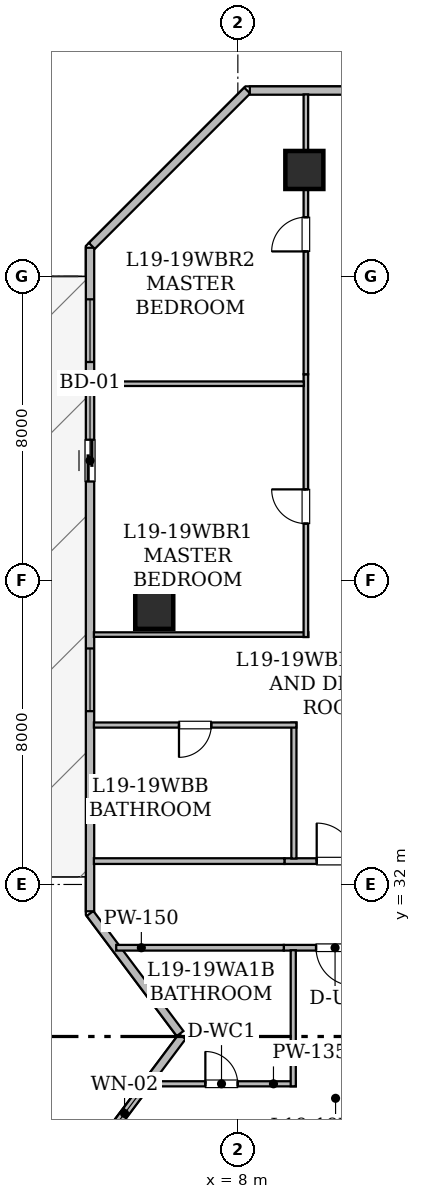
"""IFC4 building model, lengths in metres.
Left out: names, types, materials, properties, quantities, classifications, styles, units other than length and angle.
Written with IfcOpenShell. Run it as: python <this file> out.ifc"""

import sys

from ifc_helpers import new_model, si_unit, direction, frame, frame_2d, origin, origin_2d, place, context, subcontext, project, spatial, rectangle, hollow_rectangle, extrude, element, fill, save


model = new_model("IFC4")
c1 = context("Model", 3, precision=1e-05, world=origin(), true_north=direction((0.0, 1.0)))
c2 = subcontext(c1, "Body", "Model", "MODEL_VIEW")
j1 = project(units=[si_unit("LENGTHUNIT", "METRE"), si_unit("PLANEANGLEUNIT", "RADIAN")], contexts=[c1])
p1 = place(None, origin())
s1 = spatial("IfcSite", under=j1, at=p1, CompositionType="ELEMENT")
p2 = place(p1, origin())
s2 = spatial("IfcBuilding", under=s1, at=p2, CompositionType="ELEMENT")
p3 = place(p2, frame((0.0, 0.0, 77.1)))
s3 = spatial("IfcBuildingStorey", under=s2, at=p3, CompositionType="ELEMENT", Elevation=77.1)
for number, where, z_axis, x_axis in (
    (1, (9.75, 50.8, 0.0), (0.0, 0.0, 1.0), (1.0, 0.0, 0.0)),
    (2, (5.8, 39.225, 0.0), (0.0, 0.0, 1.0), (1.0, 0.0, 0.0)),
):
    element("IfcColumn", number, at=place(p3, frame(where, z_axis=z_axis, x_axis=x_axis)), inside=s3, PredefinedType="COLUMN", context=c2, shape_type="SweptSolid", body=[
        extrude(hollow_rectangle(XDim=1.0, YDim=1.0, WallThickness=0.05, at=origin_2d()), origin(), (0.0, 0.0, 1.0), 3.65),
    ])
p4 = place(p3, frame((4.145, 24.809, 0.0), z_axis=(0.0, 0.0, 1.0), x_axis=(0.599823674734, 0.800132213592, 0.0)))
e3 = element("IfcWall", 3, at=p4, inside=s3, PredefinedType="STANDARD", context=c2, shape_type="SweptSolid", body=[
    extrude(rectangle(XDim=3.988, YDim=0.22, at=frame_2d((1.994, 0.0))), origin(), (0.0, 0.0, 1.0), 3.43),
])
p5 = place(p4, frame((0.707, 0.0, 0.85)))
e4 = element("IfcOpeningElement", 4, at=p5, cuts=e3, PredefinedType="OPENING", context=c2, shape_type="SweptSolid", body=[
    extrude(rectangle(XDim=1.5, YDim=1.6, at=frame_2d((0.75, 0.8))), frame((0.0, 0.12, 0.0), z_axis=(0.0, -1.0, 0.0), x_axis=(1.0, 0.0, 0.0)), (0.0, 0.0, 1.0), 0.24),
])
p6 = place(p3, frame((6.48, 28.077, 0.0), z_axis=(0.0, 0.0, 1.0), x_axis=(-0.599960442794, 0.800029666377, 0.0)))
e5 = element("IfcWall", 5, at=p6, inside=s3, PredefinedType="STANDARD", context=c2, shape_type="SweptSolid", body=[
    extrude(rectangle(XDim=3.95, YDim=0.22, at=frame_2d((1.975, 0.0))), origin(), (0.0, 0.0, 1.0), 3.43),
])
p7 = place(p3, frame((4.11, 31.295, 0.0), z_axis=(0.0, 0.0, 1.0), x_axis=(0.0, 1.0, 0.0)))
e6 = element("IfcWall", 6, at=p7, inside=s3, PredefinedType="STANDARD", context=c2, shape_type="SweptSolid", body=[
    extrude(rectangle(XDim=17.459, YDim=0.22, at=frame_2d((8.729, 0.0))), origin(), (0.0, 0.0, 1.0), 3.43),
])
p8 = place(p7, frame((11.308, 0.0, 0.0)))
e7 = element("IfcOpeningElement", 7, at=p8, cuts=e6, PredefinedType="OPENING", context=c2, shape_type="SweptSolid", body=[
    extrude(rectangle(XDim=1.1, YDim=2.2, at=frame_2d((0.55, 1.1))), frame((0.0, 0.12, 0.0), z_axis=(0.0, -1.0, 0.0), x_axis=(1.0, 0.0, 0.0)), (0.0, 0.0, 1.0), 0.24),
])
p9 = place(p7, frame((5.265, 0.0, 0.85)))
e8 = element("IfcOpeningElement", 8, at=p9, cuts=e6, PredefinedType="OPENING", context=c2, shape_type="SweptSolid", body=[
    extrude(rectangle(XDim=1.65, YDim=1.55, at=frame_2d((0.825, 0.775))), frame((0.0, 0.12, 0.0), z_axis=(0.0, -1.0, 0.0), x_axis=(1.0, 0.0, 0.0)), (0.0, 0.0, 1.0), 0.24),
])
p10 = place(p7, frame((14.452, 0.0, 0.85)))
e9 = element("IfcOpeningElement", 9, at=p10, cuts=e6, PredefinedType="OPENING", context=c2, shape_type="SweptSolid", body=[
    extrude(rectangle(XDim=1.65, YDim=1.55, at=frame_2d((0.825, 0.775))), frame((0.0, 0.12, 0.0), z_axis=(0.0, -1.0, 0.0), x_axis=(1.0, 0.0, 0.0)), (0.0, 0.0, 1.0), 0.24),
])
p11 = place(p3, frame((4.158, 48.802, 0.0), z_axis=(0.0, 0.0, 1.0), x_axis=(0.70712789547, 0.707085666273, 0.0)))
e10 = element("IfcWall", 10, at=p11, inside=s3, PredefinedType="STANDARD", context=c2, shape_type="SweptSolid", body=[
    extrude(rectangle(XDim=5.781, YDim=0.22, at=frame_2d((2.891, 0.0))), origin(), (0.0, 0.0, 1.0), 3.43),
])
p12 = place(p3, frame((8.315, 52.89, 0.0), z_axis=(0.0, 0.0, 1.0), x_axis=(1.0, 0.0, 0.0)))
e11 = element("IfcWall", 11, at=p12, inside=s3, PredefinedType="STANDARD", context=c2, shape_type="SweptSolid", body=[
    extrude(rectangle(XDim=37.439, YDim=0.22, at=frame_2d((18.719, 0.0))), origin(), (0.0, 0.0, 1.0), 3.43),
])
p13 = place(p12, frame((5.093, 0.0, 0.85)))
e12 = element("IfcOpeningElement", 12, at=p13, cuts=e11, PredefinedType="OPENING", context=c2, shape_type="SweptSolid", body=[
    extrude(rectangle(XDim=1.65, YDim=1.55, at=frame_2d((0.825, 0.775))), frame((0.0, 0.12, 0.0), z_axis=(0.0, -1.0, 0.0), x_axis=(1.0, 0.0, 0.0)), (0.0, 0.0, 1.0), 0.24),
])
p14 = place(p12, frame((13.055, 0.0, 0.8)))
e13 = element("IfcOpeningElement", 13, at=p14, cuts=e11, PredefinedType="OPENING", context=c2, shape_type="SweptSolid", body=[
    extrude(rectangle(XDim=1.2, YDim=1.5, at=frame_2d((0.6, 0.75))), frame((0.0, 0.12, 0.0), z_axis=(0.0, -1.0, 0.0), x_axis=(1.0, 0.0, 0.0)), (0.0, 0.0, 1.0), 0.24),
])
p15 = place(p12, frame((10.005, 0.0, 0.85)))
e14 = element("IfcOpeningElement", 14, at=p15, cuts=e11, PredefinedType="OPENING", context=c2, shape_type="SweptSolid", body=[
    extrude(rectangle(XDim=1.65, YDim=1.55, at=frame_2d((0.825, 0.775))), frame((0.0, 0.12, 0.0), z_axis=(0.0, -1.0, 0.0), x_axis=(1.0, 0.0, 0.0)), (0.0, 0.0, 1.0), 0.24),
])
p16 = place(p12, frame((15.655, 0.0, 0.85)))
e15 = element("IfcOpeningElement", 15, at=p16, cuts=e11, PredefinedType="OPENING", context=c2, shape_type="SweptSolid", body=[
    extrude(rectangle(XDim=1.65, YDim=1.55, at=frame_2d((0.825, 0.775))), frame((0.0, 0.12, 0.0), z_axis=(0.0, -1.0, 0.0), x_axis=(1.0, 0.0, 0.0)), (0.0, 0.0, 1.0), 0.24),
])
p17 = place(p12, frame((25.185, 0.0, 0.8)))
e16 = element("IfcOpeningElement", 16, at=p17, cuts=e11, PredefinedType="OPENING", context=c2, shape_type="SweptSolid", body=[
    extrude(rectangle(XDim=1.2, YDim=1.5, at=frame_2d((0.6, 0.75))), frame((0.0, 0.12, 0.0), z_axis=(0.0, -1.0, 0.0), x_axis=(1.0, 0.0, 0.0)), (0.0, 0.0, 1.0), 0.24),
])
p18 = place(p12, frame((20.935, 0.0, 0.85)))
e17 = element("IfcOpeningElement", 17, at=p18, cuts=e11, PredefinedType="OPENING", context=c2, shape_type="SweptSolid", body=[
    extrude(rectangle(XDim=1.65, YDim=1.55, at=frame_2d((0.825, 0.775))), frame((0.0, 0.12, 0.0), z_axis=(0.0, -1.0, 0.0), x_axis=(1.0, 0.0, 0.0)), (0.0, 0.0, 1.0), 0.24),
])
p19 = place(p12, frame((28.985, 0.0, 0.85)))
e18 = element("IfcOpeningElement", 18, at=p19, cuts=e11, PredefinedType="OPENING", context=c2, shape_type="SweptSolid", body=[
    extrude(rectangle(XDim=1.65, YDim=1.55, at=frame_2d((0.825, 0.775))), frame((0.0, 0.12, 0.0), z_axis=(0.0, -1.0, 0.0), x_axis=(1.0, 0.0, 0.0)), (0.0, 0.0, 1.0), 0.24),
])
p20 = place(p12, frame((33.98, 0.0, 0.85)))
e19 = element("IfcOpeningElement", 19, at=p20, cuts=e11, PredefinedType="OPENING", context=c2, shape_type="SweptSolid", body=[
    extrude(rectangle(XDim=1.65, YDim=1.55, at=frame_2d((0.825, 0.775))), frame((0.0, 0.12, 0.0), z_axis=(0.0, -1.0, 0.0), x_axis=(1.0, 0.0, 0.0)), (0.0, 0.0, 1.0), 0.24),
])
p21 = place(p3, frame((11.907, 30.335, 0.0), z_axis=(0.0, 0.0, 1.0), x_axis=(-1.0, 0.0, 0.0)))
e20 = element("IfcWall", 20, at=p21, inside=s3, PredefinedType="STANDARD", context=c2, shape_type="SweptSolid", body=[
    extrude(rectangle(XDim=2.698, YDim=0.15, at=frame_2d((1.349, 0.0))), origin(), (0.0, 0.0, 1.0), 3.43),
])
p22 = place(p21, frame((0.849, 0.0, 0.0)))
e21 = element("IfcOpeningElement", 21, at=p22, cuts=e20, PredefinedType="OPENING", context=c2, shape_type="SweptSolid", body=[
    extrude(rectangle(XDim=1.0, YDim=2.15, at=frame_2d((0.5, 1.075))), frame((0.0, 0.085, 0.0), z_axis=(0.0, -1.0, 0.0), x_axis=(1.0, 0.0, 0.0)), (0.0, 0.0, 1.0), 0.17),
])
p23 = place(p3, frame((9.209, 30.335, 0.0), z_axis=(0.0, 0.0, 1.0), x_axis=(-1.0, 0.0, 0.0)))
e22 = element("IfcWall", 22, at=p23, inside=s3, PredefinedType="STANDARD", context=c2, shape_type="SweptSolid", body=[
    extrude(rectangle(XDim=4.41, YDim=0.15, at=frame_2d((2.205, 0.0))), origin(), (0.0, 0.0, 1.0), 2.803),
])
p24 = place(p3, frame((9.226, 32.615, 0.0), z_axis=(0.0, 0.0, 1.0), x_axis=(1.0, 0.0, 0.0)))
e23 = element("IfcWall", 23, at=p24, inside=s3, PredefinedType="STANDARD", context=c2, shape_type="SweptSolid", body=[
    extrude(rectangle(XDim=2.698, YDim=0.15, at=frame_2d((1.349, 0.0))), origin(), (0.0, 0.0, 1.0), 3.43),
])
p25 = place(p24, frame((0.849, 0.0, 0.0)))
e24 = element("IfcOpeningElement", 24, at=p25, cuts=e23, PredefinedType="OPENING", context=c2, shape_type="SweptSolid", body=[
    extrude(rectangle(XDim=1.0, YDim=2.15, at=frame_2d((0.5, 1.075))), frame((0.0, 0.085, 0.0), z_axis=(0.0, -1.0, 0.0), x_axis=(1.0, 0.0, 0.0)), (0.0, 0.0, 1.0), 0.17),
])
p26 = place(p3, frame((4.212, 32.615, 0.0), z_axis=(0.0, 0.0, 1.0), x_axis=(1.0, 0.0, 0.0)))
e25 = element("IfcWall", 25, at=p26, inside=s3, PredefinedType="STANDARD", context=c2, shape_type="SweptSolid", body=[
    extrude(rectangle(XDim=5.014, YDim=0.15, at=frame_2d((2.507, 0.0))), origin(), (0.0, 0.0, 1.0), 2.803),
])
p27 = place(p3, frame((5.618, 26.755, 0.0), z_axis=(0.0, 0.0, 1.0), x_axis=(1.0, 0.0, 0.0)))
e26 = element("IfcWall", 26, at=p27, inside=s3, PredefinedType="PARTITIONING", context=c2, shape_type="SweptSolid", body=[
    extrude(rectangle(XDim=3.905, YDim=0.135, at=frame_2d((1.953, 0.0))), origin(), (0.0, 0.0, 1.0), 2.803),
])
p28 = place(p27, frame((1.527, 0.0, 0.0)))
e27 = element("IfcOpeningElement", 27, at=p28, cuts=e26, PredefinedType="OPENING", context=c2, shape_type="SweptSolid", body=[
    extrude(rectangle(XDim=0.85, YDim=2.1, at=frame_2d((0.425, 1.05))), frame((0.0, 0.077, 0.0), z_axis=(0.0, -1.0, 0.0), x_axis=(1.0, 0.0, 0.0)), (0.0, 0.0, 1.0), 0.155),
])
p29 = place(p3, frame((9.458, 26.69, 0.0), z_axis=(0.0, 0.0, 1.0), x_axis=(0.0, 1.0, 0.0)))
e28 = element("IfcWall", 28, at=p29, inside=s3, PredefinedType="PARTITIONING", context=c2, shape_type="SweptSolid", body=[
    extrude(rectangle(XDim=3.58, YDim=0.135, at=frame_2d((1.79, 0.0))), origin(), (0.0, 0.0, 1.0), 3.43),
])
p30 = place(p3, frame((9.475, 32.682, 0.0), z_axis=(0.0, 0.0, 1.0), x_axis=(0.0, 1.0, 0.0)))
e29 = element("IfcWall", 29, at=p30, inside=s3, PredefinedType="PARTITIONING", context=c2, shape_type="SweptSolid", body=[
    extrude(rectangle(XDim=3.578, YDim=0.135, at=frame_2d((1.789, 0.0))), origin(), (0.0, 0.0, 1.0), 3.43),
])
p31 = place(p3, frame((9.54, 36.195, 0.0), z_axis=(0.0, 0.0, 1.0), x_axis=(-1.0, 0.0, 0.0)))
e30 = element("IfcWall", 30, at=p31, inside=s3, PredefinedType="PARTITIONING", context=c2, shape_type="SweptSolid", body=[
    extrude(rectangle(XDim=5.328, YDim=0.135, at=frame_2d((2.664, 0.0))), origin(), (0.0, 0.0, 1.0), 2.803),
])
p32 = place(p31, frame((2.239, 0.0, 0.0)))
e31 = element("IfcOpeningElement", 31, at=p32, cuts=e30, PredefinedType="OPENING", context=c2, shape_type="SweptSolid", body=[
    extrude(rectangle(XDim=0.85, YDim=2.1, at=frame_2d((0.425, 1.05))), frame((0.0, 0.077, 0.0), z_axis=(0.0, -1.0, 0.0), x_axis=(1.0, 0.0, 0.0)), (0.0, 0.0, 1.0), 0.155),
])
p33 = place(p3, frame((4.212, 38.575, 0.0), z_axis=(0.0, 0.0, 1.0), x_axis=(1.0, 0.0, 0.0)))
e32 = element("IfcWall", 32, at=p33, inside=s3, PredefinedType="PARTITIONING", context=c2, shape_type="SweptSolid", body=[
    extrude(rectangle(XDim=5.643, YDim=0.12, at=frame_2d((2.822, 0.0))), origin(), (0.0, 0.0, 1.0), 2.647),
])
p34 = place(p3, frame((9.79, 38.51, 0.0), z_axis=(0.0, 0.0, 1.0), x_axis=(0.0, 1.0, 0.0)))
e33 = element("IfcWall", 33, at=p34, inside=s3, PredefinedType="PARTITIONING", context=c2, shape_type="SweptSolid", body=[
    extrude(rectangle(XDim=6.915, YDim=0.12, at=frame_2d((3.458, 0.0))), origin(), (0.0, 0.0, 1.0), 2.647),
])
p35 = place(p34, frame((2.986, 0.0, 0.0)))
e34 = element("IfcOpeningElement", 34, at=p35, cuts=e33, PredefinedType="OPENING", context=c2, shape_type="SweptSolid", body=[
    extrude(rectangle(XDim=0.9, YDim=2.1, at=frame_2d((0.45, 1.05))), frame((0.0, 0.07, 0.0), z_axis=(0.0, -1.0, 0.0), x_axis=(1.0, 0.0, 0.0)), (0.0, 0.0, 1.0), 0.14),
])
p36 = place(p3, frame((9.79, 45.425, 0.0), z_axis=(0.0, 0.0, 1.0), x_axis=(0.0, 1.0, 0.0)))
e35 = element("IfcWall", 35, at=p36, inside=s3, PredefinedType="PARTITIONING", context=c2, shape_type="SweptSolid", body=[
    extrude(rectangle(XDim=7.363, YDim=0.12, at=frame_2d((3.682, 0.0))), origin(), (0.0, 0.0, 1.0), 2.647),
])
p37 = place(p36, frame((3.232, 0.0, 0.0)))
e36 = element("IfcOpeningElement", 36, at=p37, cuts=e35, PredefinedType="OPENING", context=c2, shape_type="SweptSolid", body=[
    extrude(rectangle(XDim=0.9, YDim=2.1, at=frame_2d((0.45, 1.05))), frame((0.0, 0.07, 0.0), z_axis=(0.0, -1.0, 0.0), x_axis=(1.0, 0.0, 0.0)), (0.0, 0.0, 1.0), 0.14),
])
p38 = place(p3, frame((4.212, 45.176, 0.0), z_axis=(0.0, 0.0, 1.0), x_axis=(1.0, 0.0, 0.0)))
e37 = element("IfcWall", 37, at=p38, inside=s3, PredefinedType="PARTITIONING", context=c2, shape_type="SweptSolid", body=[
    extrude(rectangle(XDim=5.524, YDim=0.12, at=frame_2d((2.762, 0.0))), origin(), (0.0, 0.0, 1.0), 2.803),
])
p39 = place(p8, origin())
e38 = element("IfcDoor", 38, at=p39, inside=s3, OperationType="SLIDING_TO_LEFT", PredefinedType="DOOR", context=c2, shape_type="SweptSolid", body=[
    extrude(rectangle(XDim=1.1, YDim=2.2, at=frame_2d((0.55, 1.1))), frame((0.0, 0.025, 0.0), z_axis=(0.0, -1.0, 0.0), x_axis=(1.0, 0.0, 0.0)), (0.0, 0.0, 1.0), 0.05),
])
fill(e7, e38)
p40 = place(p5, origin())
e39 = element("IfcWindow", 39, at=p40, inside=s3, PartitioningType="SINGLE_PANEL", PredefinedType="WINDOW", context=c2, shape_type="SweptSolid", body=[
    extrude(rectangle(XDim=1.5, YDim=1.6, at=frame_2d((0.75, 0.8))), frame((0.0, 0.03, 0.0), z_axis=(0.0, -1.0, 0.0), x_axis=(1.0, 0.0, 0.0)), (0.0, 0.0, 1.0), 0.06),
])
fill(e4, e39)
p41 = place(p9, origin())
e40 = element("IfcWindow", 40, at=p41, inside=s3, PartitioningType="SINGLE_PANEL", PredefinedType="WINDOW", context=c2, shape_type="SweptSolid", body=[
    extrude(rectangle(XDim=1.65, YDim=1.55, at=frame_2d((0.825, 0.775))), frame((0.0, 0.03, 0.0), z_axis=(0.0, -1.0, 0.0), x_axis=(1.0, 0.0, 0.0)), (0.0, 0.0, 1.0), 0.06),
])
fill(e8, e40)
p42 = place(p10, origin())
e41 = element("IfcWindow", 41, at=p42, inside=s3, PartitioningType="SINGLE_PANEL", PredefinedType="WINDOW", context=c2, shape_type="SweptSolid", body=[
    extrude(rectangle(XDim=1.65, YDim=1.55, at=frame_2d((0.825, 0.775))), frame((0.0, 0.03, 0.0), z_axis=(0.0, -1.0, 0.0), x_axis=(1.0, 0.0, 0.0)), (0.0, 0.0, 1.0), 0.06),
])
fill(e9, e41)
p43 = place(p22, origin())
e42 = element("IfcDoor", 42, at=p43, inside=s3, OperationType="SINGLE_SWING_LEFT", PredefinedType="DOOR", context=c2, shape_type="SweptSolid", body=[
    extrude(rectangle(XDim=1.0, YDim=2.15, at=frame_2d((0.5, 1.075))), frame((0.0, 0.025, 0.0), z_axis=(0.0, -1.0, 0.0), x_axis=(1.0, 0.0, 0.0)), (0.0, 0.0, 1.0), 0.05),
])
fill(e21, e42)
p44 = place(p25, origin())
e43 = element("IfcDoor", 43, at=p44, inside=s3, OperationType="SINGLE_SWING_LEFT", PredefinedType="DOOR", context=c2, shape_type="SweptSolid", body=[
    extrude(rectangle(XDim=1.0, YDim=2.15, at=frame_2d((0.5, 1.075))), frame((0.0, 0.025, 0.0), z_axis=(0.0, -1.0, 0.0), x_axis=(1.0, 0.0, 0.0)), (0.0, 0.0, 1.0), 0.05),
])
fill(e24, e43)
p45 = place(p28, origin())
e44 = element("IfcDoor", 44, at=p45, inside=s3, OperationType="SINGLE_SWING_LEFT", PredefinedType="DOOR", context=c2, shape_type="SweptSolid", body=[
    extrude(rectangle(XDim=0.85, YDim=2.1, at=frame_2d((0.425, 1.05))), frame((0.0, 0.025, 0.0), z_axis=(0.0, -1.0, 0.0), x_axis=(1.0, 0.0, 0.0)), (0.0, 0.0, 1.0), 0.05),
])
fill(e27, e44)
p46 = place(p32, origin())
e45 = element("IfcDoor", 45, at=p46, inside=s3, OperationType="SINGLE_SWING_RIGHT", PredefinedType="DOOR", context=c2, shape_type="SweptSolid", body=[
    extrude(rectangle(XDim=0.85, YDim=2.1, at=frame_2d((0.425, 1.05))), frame((0.0, 0.025, 0.0), z_axis=(0.0, -1.0, 0.0), x_axis=(1.0, 0.0, 0.0)), (0.0, 0.0, 1.0), 0.05),
])
fill(e31, e45)
p47 = place(p35, origin())
e46 = element("IfcDoor", 46, at=p47, inside=s3, OperationType="SINGLE_SWING_RIGHT", PredefinedType="DOOR", context=c2, shape_type="SweptSolid", body=[
    extrude(rectangle(XDim=0.9, YDim=2.1, at=frame_2d((0.45, 1.05))), frame((0.0, 0.025, 0.0), z_axis=(0.0, -1.0, 0.0), x_axis=(1.0, 0.0, 0.0)), (0.0, 0.0, 1.0), 0.05),
])
fill(e34, e46)
p48 = place(p37, origin())
e47 = element("IfcDoor", 47, at=p48, inside=s3, OperationType="SINGLE_SWING_LEFT", PredefinedType="DOOR", context=c2, shape_type="SweptSolid", body=[
    extrude(rectangle(XDim=0.9, YDim=2.1, at=frame_2d((0.45, 1.05))), frame((0.0, 0.025, 0.0), z_axis=(0.0, -1.0, 0.0), x_axis=(1.0, 0.0, 0.0)), (0.0, 0.0, 1.0), 0.05),
])
fill(e36, e47)
save(model, sys.argv[1])
